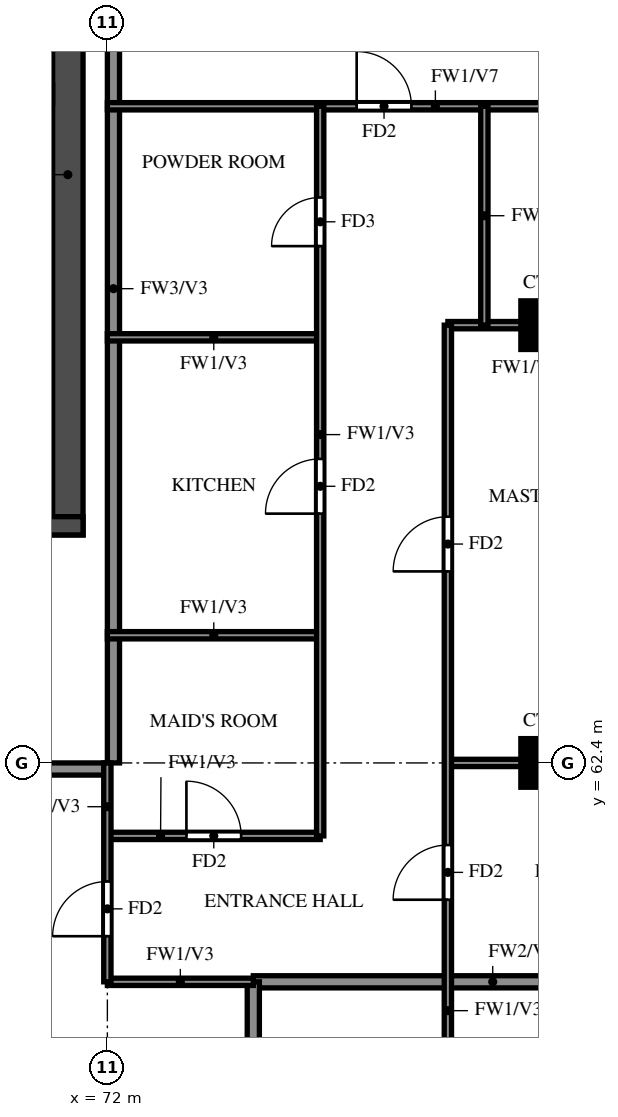
"""IFC4 building model, lengths in metres.
Left out: names, types, materials, properties, quantities, classifications, styles, units other than length and angle.
Written with IfcOpenShell. Run it as: python <this file> out.ifc"""

import sys

from ifc_helpers import new_model, si_unit, direction, frame, frame_2d, origin, origin_2d, place, context, subcontext, project, spatial, rectangle, extrude, source, transform, mapped, element, fill, save


model = new_model("IFC4")
c1 = context("Model", 3, precision=1e-05, world=origin(), true_north=direction((0.0, 1.0)))
c2 = subcontext(c1, "Body", "Model", "MODEL_VIEW")
j1 = project(units=[si_unit("LENGTHUNIT", "METRE"), si_unit("PLANEANGLEUNIT", "RADIAN")], contexts=[c1])
p1 = place(None, origin())
s1 = spatial("IfcSite", under=j1, at=p1, CompositionType="ELEMENT")
p2 = place(p1, origin())
s2 = spatial("IfcBuilding", under=s1, at=p2, CompositionType="ELEMENT")
p3 = place(p2, frame((0.0, 0.0, 243.0)))
s3 = spatial("IfcBuildingStorey", under=s2, at=p3, CompositionType="ELEMENT", Elevation=243.0)
m1 = source(origin(), c2, "Body", "SweptSolid", [
    extrude(rectangle(XDim=0.8, YDim=0.8, at=origin_2d()), origin(), (0.0, 0.0, 1.0), 3.22),
])
for number, where, z_axis, x_axis in (
    (1, (79.2, 62.4, 0.0), (0.0, 0.0, 1.0), (1.0, 0.0, 0.0)),
    (2, (79.2, 69.6, 0.0), (0.0, 0.0, 1.0), (1.0, 0.0, 0.0)),
):
    element("IfcColumn", number, at=place(p3, frame(where, z_axis=z_axis, x_axis=x_axis)), inside=s3, PredefinedType="COLUMN", context=c2, shape_type="MappedRepresentation", body=[
        mapped(m1, transform((0.0, 0.0, 0.0))),
    ])
p4 = place(p3, frame((71.35, 66.15, 0.0), z_axis=(0.0, 0.0, 1.0), x_axis=(0.0, 1.0, 0.0)))
e3 = element("IfcWall", 3, at=p4, inside=s3, PredefinedType="SHEAR", context=c2, shape_type="SweptSolid", body=[
    extrude(rectangle(XDim=11.85, YDim=0.5, at=frame_2d((5.925, 0.0))), origin(), (0.0, 0.0, 1.0), 3.22),
])
p5 = place(p3, frame((29.2, 66.3, 0.0), z_axis=(0.0, 0.0, 1.0), x_axis=(1.0, 0.0, 0.0)))
e4 = element("IfcWall", 4, at=p5, inside=s3, PredefinedType="SHEAR", context=c2, shape_type="SweptSolid", body=[
    extrude(rectangle(XDim=42.4, YDim=0.3, at=frame_2d((21.2, 0.0))), origin(), (0.0, 0.0, 1.0), 3.22),
])
p6 = place(p5, frame((1.425, 0.0, 0.0)))
e5 = element("IfcOpeningElement", 5, at=p6, cuts=e4, PredefinedType="OPENING", context=c2, shape_type="SweptSolid", body=[
    extrude(rectangle(XDim=1.1, YDim=2.1, at=frame_2d((0.55, 1.05))), frame((0.0, 0.16, 0.0), z_axis=(0.0, -1.0, 0.0), x_axis=(1.0, 0.0, 0.0)), (0.0, 0.0, 1.0), 0.32),
])
p7 = place(p5, frame((4.2, 0.0, 0.0)))
e6 = element("IfcOpeningElement", 6, at=p7, cuts=e4, PredefinedType="OPENING", context=c2, shape_type="SweptSolid", body=[
    extrude(rectangle(XDim=1.8, YDim=2.1, at=frame_2d((0.9, 1.05))), frame((0.0, 0.16, 0.0), z_axis=(0.0, -1.0, 0.0), x_axis=(1.0, 0.0, 0.0)), (0.0, 0.0, 1.0), 0.32),
])
p8 = place(p3, frame((67.2, 62.3, 0.0), z_axis=(0.0, 0.0, 1.0), x_axis=(1.0, 0.0, 0.0)))
e7 = element("IfcWall", 7, at=p8, inside=s3, PredefinedType="SOLIDWALL", context=c2, shape_type="SweptSolid", body=[
    extrude(rectangle(XDim=4.8, YDim=0.2, at=frame_2d((2.4, 0.0))), origin(), (0.0, 0.0, 1.0), 3.22),
])
p9 = place(p3, frame((72.1, 62.4, 0.0), z_axis=(0.0, 0.0, 1.0), x_axis=(0.0, 1.0, 0.0)))
e8 = element("IfcWall", 8, at=p9, inside=s3, PredefinedType="SOLIDWALL", context=c2, shape_type="SweptSolid", body=[
    extrude(rectangle(XDim=15.6, YDim=0.2, at=frame_2d((7.8, 0.0))), origin(), (0.0, 0.0, 1.0), 3.22),
])
p10 = place(p3, frame((74.4, 58.8, 0.0), z_axis=(0.0, 0.0, 1.0), x_axis=(1.0, 0.0, 0.0)))
e9 = element("IfcWall", 9, at=p10, inside=s3, PredefinedType="SOLIDWALL", context=c2, shape_type="SweptSolid", body=[
    extrude(rectangle(XDim=7.875, YDim=0.2, at=frame_2d((3.938, 0.0))), origin(), (0.0, 0.0, 1.0), 2.32),
])
p11 = place(p3, frame((74.4, 56.4, 0.0), z_axis=(0.0, 0.0, 1.0), x_axis=(0.0, 1.0, 0.0)))
e10 = element("IfcWall", 10, at=p11, inside=s3, PredefinedType="SOLIDWALL", context=c2, shape_type="SweptSolid", body=[
    extrude(rectangle(XDim=2.4, YDim=0.2, at=frame_2d((1.2, 0.0))), origin(), (0.0, 0.0, 1.0), 3.22),
])
p12 = place(p3, frame((72.0, 58.8, 0.0), z_axis=(0.0, 0.0, 1.0), x_axis=(1.0, 0.0, 0.0)))
e11 = element("IfcWall", 11, at=p12, inside=s3, PredefinedType="PARTITIONING", context=c2, shape_type="SweptSolid", body=[
    extrude(rectangle(XDim=2.4, YDim=0.12, at=frame_2d((1.2, 0.0))), origin(), (0.0, 0.0, 1.0), 3.22),
])
p13 = place(p3, frame((72.0, 61.2, 0.0), z_axis=(0.0, 0.0, 1.0), x_axis=(1.0, 0.0, 0.0)))
e12 = element("IfcWall", 12, at=p13, inside=s3, PredefinedType="PARTITIONING", context=c2, shape_type="SweptSolid", body=[
    extrude(rectangle(XDim=3.5, YDim=0.12, at=frame_2d((1.75, 0.0))), origin(), (0.0, 0.0, 1.0), 3.22),
])
p14 = place(p13, frame((1.3, 0.0, 0.0)))
e13 = element("IfcOpeningElement", 13, at=p14, cuts=e12, PredefinedType="OPENING", context=c2, shape_type="SweptSolid", body=[
    extrude(rectangle(XDim=0.9, YDim=2.1, at=frame_2d((0.45, 1.05))), frame((0.0, 0.07, 0.0), z_axis=(0.0, -1.0, 0.0), x_axis=(1.0, 0.0, 0.0)), (0.0, 0.0, 1.0), 0.14),
])
p15 = place(p3, frame((77.6, 62.4, 0.0), z_axis=(0.0, 0.0, 1.0), x_axis=(1.0, 0.0, 0.0)))
e14 = element("IfcWall", 14, at=p15, inside=s3, PredefinedType="PARTITIONING", context=c2, shape_type="SweptSolid", body=[
    extrude(rectangle(XDim=4.675, YDim=0.12, at=frame_2d((2.337, 0.0))), origin(), (0.0, 0.0, 1.0), 3.22),
])
for number, where, z_axis, x_axis in (
    (15, (72.0, 64.5, 0.0), (0.0, 0.0, 1.0), (1.0, 0.0, 0.0)),
    (16, (72.0, 69.4, 0.0), (0.0, 0.0, 1.0), (1.0, 0.0, 0.0)),
):
    element("IfcWall", number, at=place(p3, frame(where, z_axis=z_axis, x_axis=x_axis)), inside=s3, PredefinedType="PARTITIONING", context=c2, shape_type="SweptSolid", body=[
        extrude(rectangle(XDim=3.5, YDim=0.12, at=frame_2d((1.75, 0.0))), origin(), (0.0, 0.0, 1.0), 3.22),
    ])
p16 = place(p3, frame((77.6, 69.6, 0.0), z_axis=(0.0, 0.0, 1.0), x_axis=(1.0, 0.0, 0.0)))
e17 = element("IfcWall", 17, at=p16, inside=s3, PredefinedType="PARTITIONING", context=c2, shape_type="SweptSolid", body=[
    extrude(rectangle(XDim=4.675, YDim=0.12, at=frame_2d((2.337, 0.0))), origin(), (0.0, 0.0, 1.0), 3.22),
])
p17 = place(p16, frame((2.337, 0.0, 0.0)))
e18 = element("IfcOpeningElement", 18, at=p17, cuts=e17, PredefinedType="OPENING", context=c2, shape_type="SweptSolid", body=[
    extrude(rectangle(XDim=0.8, YDim=2.1, at=frame_2d((0.4, 1.05))), frame((0.0, 0.07, 0.0), z_axis=(0.0, -1.0, 0.0), x_axis=(1.0, 0.0, 0.0)), (0.0, 0.0, 1.0), 0.14),
])
p18 = place(p3, frame((72.0, 73.2, 0.0), z_axis=(0.0, 0.0, 1.0), x_axis=(1.0, 0.0, 0.0)))
e19 = element("IfcWall", 19, at=p18, inside=s3, PredefinedType="PARTITIONING", context=c2, shape_type="SweptSolid", body=[
    extrude(rectangle(XDim=10.275, YDim=0.12, at=frame_2d((5.137, 0.0))), origin(), (0.0, 0.0, 1.0), 2.32),
])
p19 = place(p18, frame((4.1, 0.0, 0.0)))
e20 = element("IfcOpeningElement", 20, at=p19, cuts=e19, PredefinedType="OPENING", context=c2, shape_type="SweptSolid", body=[
    extrude(rectangle(XDim=0.9, YDim=2.1, at=frame_2d((0.45, 1.05))), frame((0.0, 0.07, 0.0), z_axis=(0.0, -1.0, 0.0), x_axis=(1.0, 0.0, 0.0)), (0.0, 0.0, 1.0), 0.14),
])
p20 = place(p3, frame((72.0, 58.8, 0.0), z_axis=(0.0, 0.0, 1.0), x_axis=(0.0, 1.0, 0.0)))
e21 = element("IfcWall", 21, at=p20, inside=s3, PredefinedType="PARTITIONING", context=c2, shape_type="SweptSolid", body=[
    extrude(rectangle(XDim=3.6, YDim=0.12, at=frame_2d((1.8, 0.0))), origin(), (0.0, 0.0, 1.0), 3.22),
])
p21 = place(p20, frame((0.75, 0.0, 0.0)))
e22 = element("IfcOpeningElement", 22, at=p21, cuts=e21, PredefinedType="OPENING", context=c2, shape_type="SweptSolid", body=[
    extrude(rectangle(XDim=0.9, YDim=2.1, at=frame_2d((0.45, 1.05))), frame((0.0, 0.07, 0.0), z_axis=(0.0, -1.0, 0.0), x_axis=(1.0, 0.0, 0.0)), (0.0, 0.0, 1.0), 0.14),
])
p22 = place(p3, frame((75.5, 61.2, 0.0), z_axis=(0.0, 0.0, 1.0), x_axis=(0.0, 1.0, 0.0)))
e23 = element("IfcWall", 23, at=p22, inside=s3, PredefinedType="PARTITIONING", context=c2, shape_type="SweptSolid", body=[
    extrude(rectangle(XDim=12.0, YDim=0.12, at=frame_2d((6.0, 0.0))), origin(), (0.0, 0.0, 1.0), 3.22),
])
p23 = place(p22, frame((5.3, 0.0, 0.0)))
e24 = element("IfcOpeningElement", 24, at=p23, cuts=e23, PredefinedType="OPENING", context=c2, shape_type="SweptSolid", body=[
    extrude(rectangle(XDim=0.9, YDim=2.1, at=frame_2d((0.45, 1.05))), frame((0.0, 0.07, 0.0), z_axis=(0.0, -1.0, 0.0), x_axis=(1.0, 0.0, 0.0)), (0.0, 0.0, 1.0), 0.14),
])
p24 = place(p22, frame((9.7, 0.0, 0.0)))
e25 = element("IfcOpeningElement", 25, at=p24, cuts=e23, PredefinedType="OPENING", context=c2, shape_type="SweptSolid", body=[
    extrude(rectangle(XDim=0.8, YDim=2.1, at=frame_2d((0.4, 1.05))), frame((0.0, 0.07, 0.0), z_axis=(0.0, -1.0, 0.0), x_axis=(1.0, 0.0, 0.0)), (0.0, 0.0, 1.0), 0.14),
])
p25 = place(p3, frame((77.6, 48.125, 0.0), z_axis=(0.0, 0.0, 1.0), x_axis=(0.0, 1.0, 0.0)))
e26 = element("IfcWall", 26, at=p25, inside=s3, PredefinedType="PARTITIONING", context=c2, shape_type="SweptSolid", body=[
    extrude(rectangle(XDim=21.475, YDim=0.12, at=frame_2d((10.738, 0.0))), origin(), (0.0, 0.0, 1.0), 3.22),
])
p26 = place(p25, frame((2.788, 0.0, 0.0)))
e27 = element("IfcOpeningElement", 27, at=p26, cuts=e26, PredefinedType="OPENING", context=c2, shape_type="SweptSolid", body=[
    extrude(rectangle(XDim=1.5, YDim=2.1, at=frame_2d((0.75, 1.05))), frame((0.0, 0.07, 0.0), z_axis=(0.0, -1.0, 0.0), x_axis=(1.0, 0.0, 0.0)), (0.0, 0.0, 1.0), 0.14),
])
p27 = place(p25, frame((8.425, 0.0, 0.0)))
e28 = element("IfcOpeningElement", 28, at=p27, cuts=e26, PredefinedType="OPENING", context=c2, shape_type="SweptSolid", body=[
    extrude(rectangle(XDim=0.9, YDim=2.1, at=frame_2d((0.45, 1.05))), frame((0.0, 0.07, 0.0), z_axis=(0.0, -1.0, 0.0), x_axis=(1.0, 0.0, 0.0)), (0.0, 0.0, 1.0), 0.14),
])
p28 = place(p25, frame((12.025, 0.0, 0.0)))
e29 = element("IfcOpeningElement", 29, at=p28, cuts=e26, PredefinedType="OPENING", context=c2, shape_type="SweptSolid", body=[
    extrude(rectangle(XDim=0.9, YDim=2.1, at=frame_2d((0.45, 1.05))), frame((0.0, 0.07, 0.0), z_axis=(0.0, -1.0, 0.0), x_axis=(1.0, 0.0, 0.0)), (0.0, 0.0, 1.0), 0.14),
])
p29 = place(p25, frame((17.425, 0.0, 0.0)))
e30 = element("IfcOpeningElement", 30, at=p29, cuts=e26, PredefinedType="OPENING", context=c2, shape_type="SweptSolid", body=[
    extrude(rectangle(XDim=0.9, YDim=2.1, at=frame_2d((0.45, 1.05))), frame((0.0, 0.07, 0.0), z_axis=(0.0, -1.0, 0.0), x_axis=(1.0, 0.0, 0.0)), (0.0, 0.0, 1.0), 0.14),
])
p30 = place(p3, frame((78.2, 69.6, 0.0), z_axis=(0.0, 0.0, 1.0), x_axis=(0.0, 1.0, 0.0)))
e31 = element("IfcWall", 31, at=p30, inside=s3, PredefinedType="PARTITIONING", context=c2, shape_type="SweptSolid", body=[
    extrude(rectangle(XDim=3.6, YDim=0.12, at=frame_2d((1.8, 0.0))), origin(), (0.0, 0.0, 1.0), 3.22),
])
p31 = place(p21, origin())
e32 = element("IfcDoor", 32, at=p31, inside=s3, OperationType="SINGLE_SWING_LEFT", PredefinedType="DOOR", context=c2, shape_type="SweptSolid", body=[
    extrude(rectangle(XDim=0.9, YDim=2.1, at=frame_2d((0.45, 1.05))), frame((0.0, 0.025, 0.0), z_axis=(0.0, -1.0, 0.0), x_axis=(1.0, 0.0, 0.0)), (0.0, 0.0, 1.0), 0.05),
])
fill(e22, e32)
p32 = place(p28, origin())
e33 = element("IfcDoor", 33, at=p32, inside=s3, OperationType="SINGLE_SWING_LEFT", PredefinedType="DOOR", context=c2, shape_type="SweptSolid", body=[
    extrude(rectangle(XDim=0.9, YDim=2.1, at=frame_2d((0.45, 1.05))), frame((0.0, 0.025, 0.0), z_axis=(0.0, -1.0, 0.0), x_axis=(1.0, 0.0, 0.0)), (0.0, 0.0, 1.0), 0.05),
])
fill(e29, e33)
p33 = place(p29, origin())
e34 = element("IfcDoor", 34, at=p33, inside=s3, OperationType="SINGLE_SWING_LEFT", PredefinedType="DOOR", context=c2, shape_type="SweptSolid", body=[
    extrude(rectangle(XDim=0.9, YDim=2.1, at=frame_2d((0.45, 1.05))), frame((0.0, 0.025, 0.0), z_axis=(0.0, -1.0, 0.0), x_axis=(1.0, 0.0, 0.0)), (0.0, 0.0, 1.0), 0.05),
])
fill(e30, e34)
p34 = place(p19, origin())
e35 = element("IfcDoor", 35, at=p34, inside=s3, OperationType="SINGLE_SWING_LEFT", PredefinedType="DOOR", context=c2, shape_type="SweptSolid", body=[
    extrude(rectangle(XDim=0.9, YDim=2.1, at=frame_2d((0.45, 1.05))), frame((0.0, 0.025, 0.0), z_axis=(0.0, -1.0, 0.0), x_axis=(1.0, 0.0, 0.0)), (0.0, 0.0, 1.0), 0.05),
])
fill(e20, e35)
p35 = place(p14, origin())
e36 = element("IfcDoor", 36, at=p35, inside=s3, OperationType="SINGLE_SWING_LEFT", PredefinedType="DOOR", context=c2, shape_type="SweptSolid", body=[
    extrude(rectangle(XDim=0.9, YDim=2.1, at=frame_2d((0.45, 1.05))), frame((0.0, 0.025, 0.0), z_axis=(0.0, -1.0, 0.0), x_axis=(1.0, 0.0, 0.0)), (0.0, 0.0, 1.0), 0.05),
])
fill(e13, e36)
p36 = place(p23, origin())
e37 = element("IfcDoor", 37, at=p36, inside=s3, OperationType="SINGLE_SWING_RIGHT", PredefinedType="DOOR", context=c2, shape_type="SweptSolid", body=[
    extrude(rectangle(XDim=0.9, YDim=2.1, at=frame_2d((0.45, 1.05))), frame((0.0, 0.025, 0.0), z_axis=(0.0, -1.0, 0.0), x_axis=(1.0, 0.0, 0.0)), (0.0, 0.0, 1.0), 0.05),
])
fill(e24, e37)
p37 = place(p24, origin())
e38 = element("IfcDoor", 38, at=p37, inside=s3, OperationType="SINGLE_SWING_LEFT", PredefinedType="DOOR", context=c2, shape_type="SweptSolid", body=[
    extrude(rectangle(XDim=0.8, YDim=2.1, at=frame_2d((0.4, 1.05))), frame((0.0, 0.025, 0.0), z_axis=(0.0, -1.0, 0.0), x_axis=(1.0, 0.0, 0.0)), (0.0, 0.0, 1.0), 0.05),
])
fill(e25, e38)
save(model, sys.argv[1])
